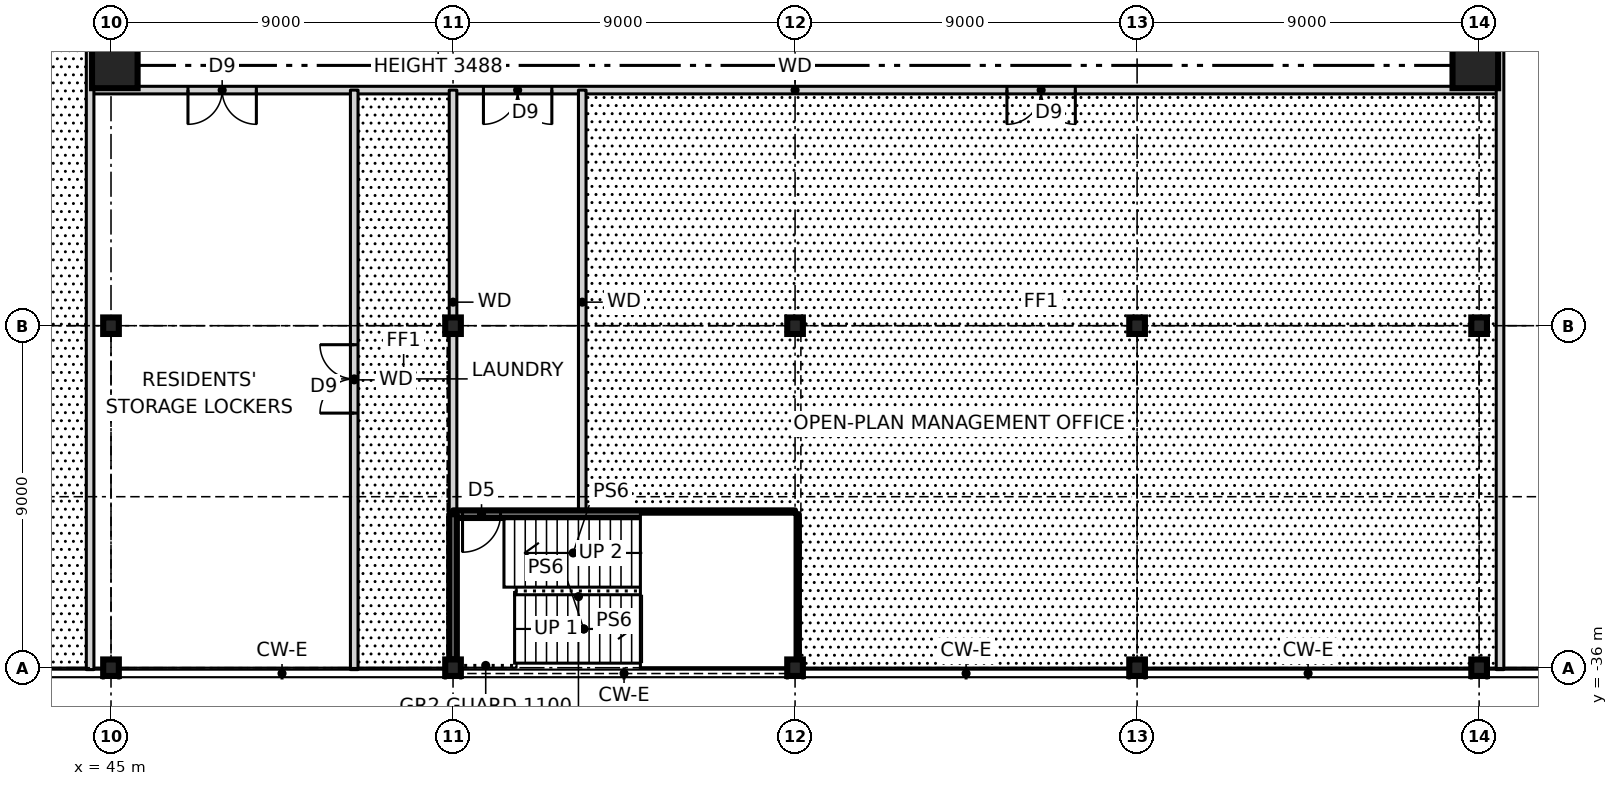
"""IFC4 building model, lengths in metres.
Left out: names, types, materials, properties, quantities, classifications, styles, units other than length and angle.
Written with IfcOpenShell. Run it as: python <this file> out.ifc"""

import sys

from ifc_helpers import new_model, si_unit, direction, frame, frame_2d, origin, origin_2d, place, context, subcontext, project, spatial, rectangle, hollow_rectangle, i_section, extrude, element, fill, save


model = new_model("IFC4")
c1 = context("Model", 3, precision=1e-05, world=origin(), true_north=direction((0.0, 1.0)))
c2 = subcontext(c1, "Body", "Model", "MODEL_VIEW")
j1 = project(units=[si_unit("LENGTHUNIT", "METRE"), si_unit("PLANEANGLEUNIT", "RADIAN")], contexts=[c1])
p1 = place(None, origin())
s1 = spatial("IfcSite", under=j1, at=p1, CompositionType="ELEMENT")
p2 = place(p1, origin())
s2 = spatial("IfcBuilding", under=s1, at=p2, CompositionType="ELEMENT")
p3 = place(p2, frame((0.0, 0.0, 6.0)))
s3 = spatial("IfcBuildingStorey", under=s2, at=p3, CompositionType="ELEMENT", Elevation=6.0)
for number, where, z_axis, x_axis in (
    (1, (45.1, -20.15, 0.0), (0.0, 0.0, 1.0), (1.0, 0.0, 0.0)),
    (2, (80.9, -20.15, 0.0), (0.0, 0.0, 1.0), (1.0, 0.0, 0.0)),
):
    element("IfcColumn", number, at=place(p3, frame(where, z_axis=z_axis, x_axis=x_axis)), inside=s3, PredefinedType="COLUMN", context=c2, shape_type="SweptSolid", body=[
        extrude(hollow_rectangle(XDim=1.2, YDim=1.2, WallThickness=0.07, at=origin_2d()), origin(), (0.0, 0.0, 1.0), 4.5),
    ])
for number, where, z_axis, x_axis in (
    (3, (45.0, -36.0, 0.0), (0.0, 0.0, 1.0), (1.0, 0.0, 0.0)),
    (4, (45.0, -27.0, 0.0), (0.0, 0.0, 1.0), (1.0, 0.0, 0.0)),
    (5, (54.0, -36.0, 0.0), (0.0, 0.0, 1.0), (1.0, 0.0, 0.0)),
    (6, (54.0, -27.0, 0.0), (0.0, 0.0, 1.0), (1.0, 0.0, 0.0)),
    (7, (63.0, -36.0, 0.0), (0.0, 0.0, 1.0), (1.0, 0.0, 0.0)),
    (8, (63.0, -27.0, 0.0), (0.0, 0.0, 1.0), (1.0, 0.0, 0.0)),
    (9, (72.0, -36.0, 0.0), (0.0, 0.0, 1.0), (1.0, 0.0, 0.0)),
    (10, (72.0, -27.0, 0.0), (0.0, 0.0, 1.0), (1.0, 0.0, 0.0)),
    (11, (81.0, -36.0, 0.0), (0.0, 0.0, 1.0), (1.0, 0.0, 0.0)),
    (12, (81.0, -27.0, 0.0), (0.0, 0.0, 1.0), (1.0, 0.0, 0.0)),
):
    element("IfcColumn", number, at=place(p3, frame(where, z_axis=z_axis, x_axis=x_axis)), inside=s3, PredefinedType="COLUMN", context=c2, shape_type="SweptSolid", body=[
        extrude(i_section(OverallWidth=0.411, OverallDepth=0.434, WebThickness=0.036, FlangeThickness=0.057, at=origin_2d()), origin(), (0.0, 0.0, 1.0), 4.5),
    ])
p4 = place(p2, origin())
s4 = spatial("IfcBuildingStorey", under=s2, at=p4, CompositionType="ELEMENT", Elevation=0.0)
p5 = place(p4, frame((44.494, -36.25, -0.15), z_axis=(0.0, 0.0, 1.0), x_axis=(0.0, -1.0, 0.0)))
e13 = element("IfcWall", 13, at=p5, inside=s4, PredefinedType="SOLIDWALL", context=c2, shape_type="SweptSolid", body=[
    extrude(rectangle(XDim=3.05, YDim=0.6, at=frame_2d((1.525, 0.0))), origin(), (0.0, 0.0, 1.0), 9.15),
])
p6 = place(p3, frame((54.0, -31.96, 0.0), z_axis=(0.0, 0.0, 1.0), x_axis=(1.0, 0.0, 0.0)))
e14 = element("IfcWall", 14, at=p6, inside=s3, PredefinedType="SOLIDWALL", context=c2, shape_type="SweptSolid", body=[
    extrude(rectangle(XDim=9.0, YDim=0.2, at=frame_2d((4.5, 0.0))), origin(), (0.0, 0.0, 1.0), 4.5),
])
p7 = place(p6, frame((0.25, 0.0, 0.0)))
e15 = element("IfcOpeningElement", 15, at=p7, cuts=e14, PredefinedType="OPENING", context=c2, shape_type="SweptSolid", body=[
    extrude(rectangle(XDim=1.0, YDim=2.1, at=frame_2d((0.5, 1.05))), frame((0.0, 0.11, 0.0), z_axis=(0.0, -1.0, 0.0), x_axis=(1.0, 0.0, 0.0)), (0.0, 0.0, 1.0), 0.22),
])
p8 = place(p3, frame((44.45, -20.8, 0.0), z_axis=(0.0, 0.0, 1.0), x_axis=(1.0, 0.0, 0.0)))
e16 = element("IfcWall", 16, at=p8, inside=s3, PredefinedType="SOLIDWALL", context=c2, shape_type="SweptSolid", body=[
    extrude(rectangle(XDim=37.1, YDim=0.2, at=frame_2d((18.55, 0.0))), origin(), (0.0, 0.0, 1.0), 4.25),
])
p9 = place(p8, frame((2.575, 0.0, 0.0)))
e17 = element("IfcOpeningElement", 17, at=p9, cuts=e16, PredefinedType="OPENING", context=c2, shape_type="SweptSolid", body=[
    extrude(rectangle(XDim=1.8, YDim=2.1, at=frame_2d((0.9, 1.05))), frame((0.0, 0.11, 0.0), z_axis=(0.0, -1.0, 0.0), x_axis=(1.0, 0.0, 0.0)), (0.0, 0.0, 1.0), 0.22),
])
p10 = place(p8, frame((24.125, 0.0, 0.0)))
e18 = element("IfcOpeningElement", 18, at=p10, cuts=e16, PredefinedType="OPENING", context=c2, shape_type="SweptSolid", body=[
    extrude(rectangle(XDim=1.8, YDim=2.1, at=frame_2d((0.9, 1.05))), frame((0.0, 0.11, 0.0), z_axis=(0.0, -1.0, 0.0), x_axis=(1.0, 0.0, 0.0)), (0.0, 0.0, 1.0), 0.22),
])
p11 = place(p8, frame((10.35, 0.0, 0.0)))
e19 = element("IfcOpeningElement", 19, at=p11, cuts=e16, PredefinedType="OPENING", context=c2, shape_type="SweptSolid", body=[
    extrude(rectangle(XDim=1.8, YDim=2.1, at=frame_2d((0.9, 1.05))), frame((0.0, 0.11, 0.0), z_axis=(0.0, -1.0, 0.0), x_axis=(1.0, 0.0, 0.0)), (0.0, 0.0, 1.0), 0.22),
])
p12 = place(p3, frame((81.55, -36.05, 0.0), z_axis=(0.0, 0.0, 1.0), x_axis=(0.0, 1.0, 0.0)))
e20 = element("IfcWall", 20, at=p12, inside=s3, PredefinedType="SOLIDWALL", context=c2, shape_type="SweptSolid", body=[
    extrude(rectangle(XDim=72.1, YDim=0.2, at=frame_2d((36.05, 0.0))), origin(), (0.0, 0.0, 1.0), 4.25),
])
p13 = place(p12, frame((66.65, 0.0, 0.0)))
e21 = element("IfcOpeningElement", 21, at=p13, cuts=e20, PredefinedType="OPENING", context=c2, shape_type="SweptSolid", body=[
    extrude(rectangle(XDim=1.8, YDim=2.1, at=frame_2d((0.9, 1.05))), frame((0.0, 0.11, 0.0), z_axis=(0.0, -1.0, 0.0), x_axis=(1.0, 0.0, 0.0)), (0.0, 0.0, 1.0), 0.22),
])
p14 = place(p12, frame((25.6, 0.0, 0.0)))
e22 = element("IfcOpeningElement", 22, at=p14, cuts=e20, PredefinedType="OPENING", context=c2, shape_type="SweptSolid", body=[
    extrude(rectangle(XDim=1.8, YDim=2.1, at=frame_2d((0.9, 1.05))), frame((0.0, 0.11, 0.0), z_axis=(0.0, -1.0, 0.0), x_axis=(1.0, 0.0, 0.0)), (0.0, 0.0, 1.0), 0.22),
])
p15 = place(p12, frame((35.45, 0.0, 0.0)))
e23 = element("IfcOpeningElement", 23, at=p15, cuts=e20, PredefinedType="OPENING", context=c2, shape_type="SweptSolid", body=[
    extrude(rectangle(XDim=1.8, YDim=2.1, at=frame_2d((0.9, 1.05))), frame((0.0, 0.11, 0.0), z_axis=(0.0, -1.0, 0.0), x_axis=(1.0, 0.0, 0.0)), (0.0, 0.0, 1.0), 0.22),
])
p16 = place(p12, frame((50.15, 0.0, 0.0)))
e24 = element("IfcOpeningElement", 24, at=p16, cuts=e20, PredefinedType="OPENING", context=c2, shape_type="SweptSolid", body=[
    extrude(rectangle(XDim=1.8, YDim=2.1, at=frame_2d((0.9, 1.05))), frame((0.0, 0.11, 0.0), z_axis=(0.0, -1.0, 0.0), x_axis=(1.0, 0.0, 0.0)), (0.0, 0.0, 1.0), 0.22),
])
p17 = place(p3, frame((63.0, -35.783, 0.0), z_axis=(0.0, 0.0, 1.0), x_axis=(0.0, 1.0, 0.0)))
e25 = element("IfcWall", 25, at=p17, inside=s3, PredefinedType="SOLIDWALL", context=c2, shape_type="SweptSolid", body=[
    extrude(rectangle(XDim=3.823, YDim=0.2, at=frame_2d((1.911, 0.0))), origin(), (0.0, 0.0, 1.0), 4.5),
])
p18 = place(p3, frame((57.4, -31.96, 0.0), z_axis=(0.0, 0.0, 1.0), x_axis=(0.0, 1.0, 0.0)))
e26 = element("IfcWall", 26, at=p18, inside=s3, PredefinedType="SOLIDWALL", context=c2, shape_type="SweptSolid", body=[
    extrude(rectangle(XDim=11.16, YDim=0.2, at=frame_2d((5.58, 0.0))), origin(), (0.0, 0.0, 1.0), 4.25),
])
p19 = place(p3, frame((54.0, -35.783, 0.0), z_axis=(0.0, 0.0, 1.0), x_axis=(0.0, 1.0, 0.0)))
e27 = element("IfcWall", 27, at=p19, inside=s3, PredefinedType="SOLIDWALL", context=c2, shape_type="SweptSolid", body=[
    extrude(rectangle(XDim=3.823, YDim=0.2, at=frame_2d((1.911, 0.0))), origin(), (0.0, 0.0, 1.0), 4.5),
])
p20 = place(p3, frame((54.0, -31.96, 0.0), z_axis=(0.0, 0.0, 1.0), x_axis=(0.0, 1.0, 0.0)))
e28 = element("IfcWall", 28, at=p20, inside=s3, PredefinedType="SOLIDWALL", context=c2, shape_type="SweptSolid", body=[
    extrude(rectangle(XDim=11.16, YDim=0.2, at=frame_2d((5.58, 0.0))), origin(), (0.0, 0.0, 1.0), 4.25),
])
p21 = place(p3, frame((51.4, -36.05, 0.0), z_axis=(0.0, 0.0, 1.0), x_axis=(0.0, 1.0, 0.0)))
e29 = element("IfcWall", 29, at=p21, inside=s3, PredefinedType="SOLIDWALL", context=c2, shape_type="SweptSolid", body=[
    extrude(rectangle(XDim=15.25, YDim=0.2, at=frame_2d((7.625, 0.0))), origin(), (0.0, 0.0, 1.0), 4.25),
])
p22 = place(p21, frame((6.75, 0.0, 0.0)))
e30 = element("IfcOpeningElement", 30, at=p22, cuts=e29, PredefinedType="OPENING", context=c2, shape_type="SweptSolid", body=[
    extrude(rectangle(XDim=1.8, YDim=2.1, at=frame_2d((0.9, 1.05))), frame((0.0, 0.11, 0.0), z_axis=(0.0, -1.0, 0.0), x_axis=(1.0, 0.0, 0.0)), (0.0, 0.0, 1.0), 0.22),
])
p23 = place(p3, frame((44.45, -36.05, 0.0), z_axis=(0.0, 0.0, 1.0), x_axis=(0.0, 1.0, 0.0)))
e31 = element("IfcWall", 31, at=p23, inside=s3, PredefinedType="SOLIDWALL", context=c2, shape_type="SweptSolid", body=[
    extrude(rectangle(XDim=72.1, YDim=0.2, at=frame_2d((36.05, 0.0))), origin(), (0.0, 0.0, 1.0), 4.25),
])
p24 = place(p23, frame((25.6, 0.0, 0.0)))
e32 = element("IfcOpeningElement", 32, at=p24, cuts=e31, PredefinedType="OPENING", context=c2, shape_type="SweptSolid", body=[
    extrude(rectangle(XDim=1.8, YDim=2.1, at=frame_2d((0.9, 1.05))), frame((0.0, 0.11, 0.0), z_axis=(0.0, -1.0, 0.0), x_axis=(1.0, 0.0, 0.0)), (0.0, 0.0, 1.0), 0.22),
])
p25 = place(p23, frame((44.7, 0.0, 0.0)))
e33 = element("IfcOpeningElement", 33, at=p25, cuts=e31, PredefinedType="OPENING", context=c2, shape_type="SweptSolid", body=[
    extrude(rectangle(XDim=1.8, YDim=2.1, at=frame_2d((0.9, 1.05))), frame((0.0, 0.11, 0.0), z_axis=(0.0, -1.0, 0.0), x_axis=(1.0, 0.0, 0.0)), (0.0, 0.0, 1.0), 0.22),
])
p26 = place(p9, frame((1.8, 0.0, 0.0), z_axis=(0.0, 0.0, 1.0), x_axis=(-1.0, 0.0, 0.0)))
e34 = element("IfcDoor", 34, at=p26, inside=s3, OperationType="DOUBLE_DOOR_SINGLE_SWING", PredefinedType="DOOR", context=c2, shape_type="SweptSolid", body=[
    extrude(rectangle(XDim=1.8, YDim=2.1, at=frame_2d((0.9, 1.05))), frame((0.0, 0.025, 0.0), z_axis=(0.0, -1.0, 0.0), x_axis=(1.0, 0.0, 0.0)), (0.0, 0.0, 1.0), 0.05),
])
fill(e17, e34)
p27 = place(p22, origin())
e35 = element("IfcDoor", 35, at=p27, inside=s3, OperationType="DOUBLE_DOOR_SINGLE_SWING", PredefinedType="DOOR", context=c2, shape_type="SweptSolid", body=[
    extrude(rectangle(XDim=1.8, YDim=2.1, at=frame_2d((0.9, 1.05))), frame((0.0, 0.025, 0.0), z_axis=(0.0, -1.0, 0.0), x_axis=(1.0, 0.0, 0.0)), (0.0, 0.0, 1.0), 0.05),
])
fill(e30, e35)
p28 = place(p10, frame((1.8, 0.0, 0.0), z_axis=(0.0, 0.0, 1.0), x_axis=(-1.0, 0.0, 0.0)))
e36 = element("IfcDoor", 36, at=p28, inside=s3, OperationType="DOUBLE_DOOR_SINGLE_SWING", PredefinedType="DOOR", context=c2, shape_type="SweptSolid", body=[
    extrude(rectangle(XDim=1.8, YDim=2.1, at=frame_2d((0.9, 1.05))), frame((0.0, 0.025, 0.0), z_axis=(0.0, -1.0, 0.0), x_axis=(1.0, 0.0, 0.0)), (0.0, 0.0, 1.0), 0.05),
])
fill(e18, e36)
p29 = place(p11, frame((1.8, 0.0, 0.0), z_axis=(0.0, 0.0, 1.0), x_axis=(-1.0, 0.0, 0.0)))
e37 = element("IfcDoor", 37, at=p29, inside=s3, OperationType="DOUBLE_DOOR_SINGLE_SWING", PredefinedType="DOOR", context=c2, shape_type="SweptSolid", body=[
    extrude(rectangle(XDim=1.8, YDim=2.1, at=frame_2d((0.9, 1.05))), frame((0.0, 0.025, 0.0), z_axis=(0.0, -1.0, 0.0), x_axis=(1.0, 0.0, 0.0)), (0.0, 0.0, 1.0), 0.05),
])
fill(e19, e37)
p30 = place(p7, frame((1.0, 0.0, 0.0), z_axis=(0.0, 0.0, 1.0), x_axis=(-1.0, 0.0, 0.0)))
e38 = element("IfcDoor", 38, at=p30, inside=s3, OperationType="SINGLE_SWING_RIGHT", PredefinedType="DOOR", context=c2, shape_type="SweptSolid", body=[
    extrude(rectangle(XDim=1.0, YDim=2.1, at=frame_2d((0.5, 1.05))), frame((0.0, 0.025, 0.0), z_axis=(0.0, -1.0, 0.0), x_axis=(1.0, 0.0, 0.0)), (0.0, 0.0, 1.0), 0.05),
])
fill(e15, e38)
save(model, sys.argv[1])
